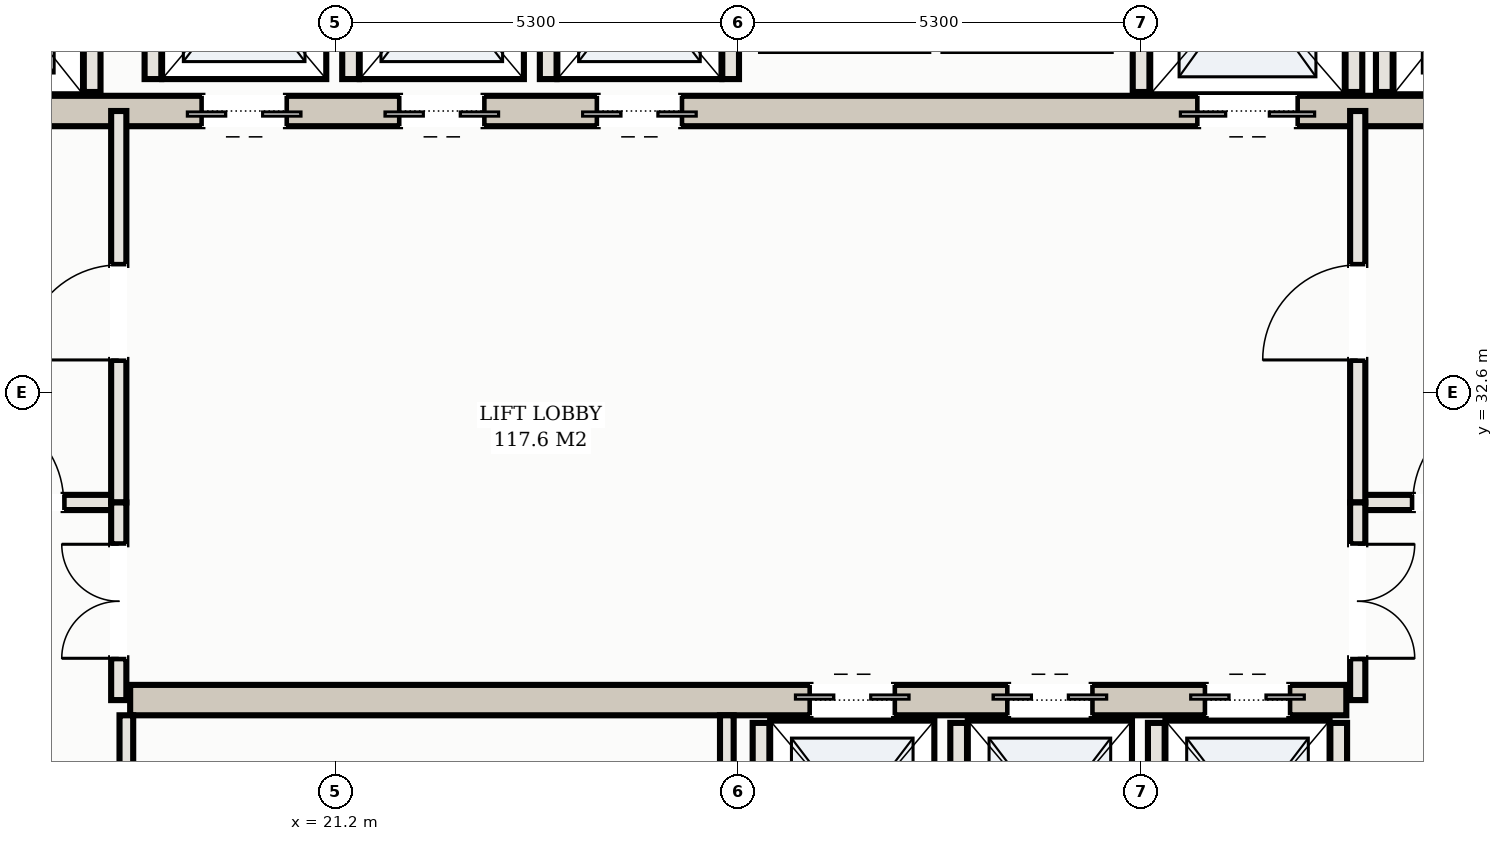
"""IFC4 building model, lengths in metres.
Left out: names, types, materials, properties, quantities, classifications, styles, units other than length and angle.
Written with IfcOpenShell. Run it as: python <this file> out.ifc"""

import sys

from ifc_helpers import new_model, si_unit, direction, frame, frame_2d, origin, place, context, subcontext, project, spatial, rectangle, extrude, element, fill, save


model = new_model("IFC4")
c1 = context("Model", 3, precision=1e-05, world=origin(), true_north=direction((0.0, 1.0)))
c2 = subcontext(c1, "Body", "Model", "MODEL_VIEW")
j1 = project(units=[si_unit("LENGTHUNIT", "METRE"), si_unit("PLANEANGLEUNIT", "RADIAN")], contexts=[c1])
p1 = place(None, origin())
s1 = spatial("IfcSite", under=j1, at=p1, CompositionType="ELEMENT")
p2 = place(p1, origin())
s2 = spatial("IfcBuilding", under=s1, at=p2, CompositionType="ELEMENT")
p3 = place(p2, frame((0.0, 0.0, 134.7)))
s3 = spatial("IfcBuildingStorey", under=s2, at=p3, CompositionType="ELEMENT", Elevation=134.7)
p4 = place(p3, frame((15.5, 36.3, 0.0), z_axis=(0.0, 0.0, 1.0), x_axis=(1.0, 0.0, 0.0)))
e1 = element("IfcWall", 1, at=p4, inside=s3, PredefinedType="SHEAR", context=c2, shape_type="SweptSolid", body=[
    extrude(rectangle(XDim=22.0, YDim=0.4, at=frame_2d((11.0, 0.0))), origin(), (0.0, 0.0, 1.0), 4.3),
])
p5 = place(p4, frame((0.65, 0.0, 0.0)))
e2 = element("IfcOpeningElement", 2, at=p5, cuts=e1, PredefinedType="OPENING", context=c2, shape_type="SweptSolid", body=[
    extrude(rectangle(XDim=1.1, YDim=2.15, at=frame_2d((0.55, 1.075))), frame((0.0, 0.21, 0.0), z_axis=(0.0, -1.0, 0.0), x_axis=(1.0, 0.0, 0.0)), (0.0, 0.0, 1.0), 0.42),
])
p6 = place(p4, frame((20.25, 0.0, 0.0)))
e3 = element("IfcOpeningElement", 3, at=p6, cuts=e1, PredefinedType="OPENING", context=c2, shape_type="SweptSolid", body=[
    extrude(rectangle(XDim=1.1, YDim=2.15, at=frame_2d((0.55, 1.075))), frame((0.0, 0.21, 0.0), z_axis=(0.0, -1.0, 0.0), x_axis=(1.0, 0.0, 0.0)), (0.0, 0.0, 1.0), 0.42),
])
p7 = place(p4, frame((17.05, 0.0, 0.0)))
e4 = element("IfcOpeningElement", 4, at=p7, cuts=e1, PredefinedType="OPENING", context=c2, shape_type="SweptSolid", body=[
    extrude(rectangle(XDim=1.3, YDim=2.2, at=frame_2d((0.65, 1.1))), frame((0.0, 0.21, 0.0), z_axis=(0.0, -1.0, 0.0), x_axis=(1.0, 0.0, 0.0)), (0.0, 0.0, 1.0), 0.42),
])
p8 = place(p4, frame((3.95, 0.0, 0.0)))
e5 = element("IfcOpeningElement", 5, at=p8, cuts=e1, PredefinedType="OPENING", context=c2, shape_type="SweptSolid", body=[
    extrude(rectangle(XDim=1.1, YDim=2.15, at=frame_2d((0.55, 1.075))), frame((0.0, 0.21, 0.0), z_axis=(0.0, -1.0, 0.0), x_axis=(1.0, 0.0, 0.0)), (0.0, 0.0, 1.0), 0.42),
])
p9 = place(p4, frame((6.55, 0.0, 0.0)))
e6 = element("IfcOpeningElement", 6, at=p9, cuts=e1, PredefinedType="OPENING", context=c2, shape_type="SweptSolid", body=[
    extrude(rectangle(XDim=1.1, YDim=2.15, at=frame_2d((0.55, 1.075))), frame((0.0, 0.21, 0.0), z_axis=(0.0, -1.0, 0.0), x_axis=(1.0, 0.0, 0.0)), (0.0, 0.0, 1.0), 0.42),
])
p10 = place(p4, frame((9.15, 0.0, 0.0)))
e7 = element("IfcOpeningElement", 7, at=p10, cuts=e1, PredefinedType="OPENING", context=c2, shape_type="SweptSolid", body=[
    extrude(rectangle(XDim=1.1, YDim=2.15, at=frame_2d((0.55, 1.075))), frame((0.0, 0.21, 0.0), z_axis=(0.0, -1.0, 0.0), x_axis=(1.0, 0.0, 0.0)), (0.0, 0.0, 1.0), 0.42),
])
p11 = place(p3, frame((18.5, 28.55, 0.0), z_axis=(0.0, 0.0, 1.0), x_axis=(1.0, 0.0, 0.0)))
e8 = element("IfcWall", 8, at=p11, inside=s3, PredefinedType="SHEAR", context=c2, shape_type="SweptSolid", body=[
    extrude(rectangle(XDim=16.0, YDim=0.4, at=frame_2d((8.0, 0.0))), origin(), (0.0, 0.0, 1.0), 4.3),
])
p12 = place(p11, frame((8.95, 0.0, 0.0)))
e9 = element("IfcOpeningElement", 9, at=p12, cuts=e8, PredefinedType="OPENING", context=c2, shape_type="SweptSolid", body=[
    extrude(rectangle(XDim=1.1, YDim=2.15, at=frame_2d((0.55, 1.075))), frame((0.0, 0.21, 0.0), z_axis=(0.0, -1.0, 0.0), x_axis=(1.0, 0.0, 0.0)), (0.0, 0.0, 1.0), 0.42),
])
p13 = place(p11, frame((11.55, 0.0, 0.0)))
e10 = element("IfcOpeningElement", 10, at=p13, cuts=e8, PredefinedType="OPENING", context=c2, shape_type="SweptSolid", body=[
    extrude(rectangle(XDim=1.1, YDim=2.15, at=frame_2d((0.55, 1.075))), frame((0.0, 0.21, 0.0), z_axis=(0.0, -1.0, 0.0), x_axis=(1.0, 0.0, 0.0)), (0.0, 0.0, 1.0), 0.42),
])
p14 = place(p11, frame((14.15, 0.0, 0.0)))
e11 = element("IfcOpeningElement", 11, at=p14, cuts=e8, PredefinedType="OPENING", context=c2, shape_type="SweptSolid", body=[
    extrude(rectangle(XDim=1.1, YDim=2.15, at=frame_2d((0.55, 1.075))), frame((0.0, 0.21, 0.0), z_axis=(0.0, -1.0, 0.0), x_axis=(1.0, 0.0, 0.0)), (0.0, 0.0, 1.0), 0.42),
])
for number, where, z_axis, x_axis in (
    (12, (18.0, 36.55, 0.0), (0.0, 0.0, 1.0), (0.0, 1.0, 0.0)),
    (13, (35.0, 36.55, 0.0), (0.0, 0.0, 1.0), (0.0, 1.0, 0.0)),
    (14, (31.8, 36.55, 0.0), (0.0, 0.0, 1.0), (0.0, 1.0, 0.0)),
    (15, (34.6, 36.55, 0.0), (0.0, 0.0, 1.0), (0.0, 1.0, 0.0)),
):
    element("IfcWall", number, at=place(p3, frame(where, z_axis=z_axis, x_axis=x_axis)), inside=s3, PredefinedType="SOLIDWALL", context=c2, shape_type="SweptSolid", body=[
        extrude(rectangle(XDim=2.93, YDim=0.22, at=frame_2d((1.465, 0.0))), origin(), (0.0, 0.0, 1.0), 4.3),
    ])
for number, where, z_axis, x_axis in (
    (16, (26.8, 25.72, 0.0), (0.0, 0.0, 1.0), (0.0, 1.0, 0.0)),
    (17, (29.4, 25.72, 0.0), (0.0, 0.0, 1.0), (0.0, 1.0, 0.0)),
    (18, (32.0, 25.72, 0.0), (0.0, 0.0, 1.0), (0.0, 1.0, 0.0)),
    (19, (34.4, 25.72, 0.0), (0.0, 0.0, 1.0), (0.0, 1.0, 0.0)),
):
    element("IfcWall", number, at=place(p3, frame(where, z_axis=z_axis, x_axis=x_axis)), inside=s3, PredefinedType="SOLIDWALL", context=c2, shape_type="SweptSolid", body=[
        extrude(rectangle(XDim=2.53, YDim=0.22, at=frame_2d((1.265, 0.0))), origin(), (0.0, 0.0, 1.0), 4.3),
    ])
for number, where, z_axis, x_axis in (
    (20, (18.8, 36.72, 0.0), (0.0, 0.0, 1.0), (0.0, 1.0, 0.0)),
    (21, (21.4, 36.72, 0.0), (0.0, 0.0, 1.0), (0.0, 1.0, 0.0)),
    (22, (24.0, 36.72, 0.0), (0.0, 0.0, 1.0), (0.0, 1.0, 0.0)),
    (23, (26.4, 36.72, 0.0), (0.0, 0.0, 1.0), (0.0, 1.0, 0.0)),
):
    element("IfcWall", number, at=place(p3, frame(where, z_axis=z_axis, x_axis=x_axis)), inside=s3, PredefinedType="SOLIDWALL", context=c2, shape_type="SweptSolid", body=[
        extrude(rectangle(XDim=2.56, YDim=0.22, at=frame_2d((1.28, 0.0))), origin(), (0.0, 0.0, 1.0), 4.3),
    ])
p15 = place(p3, frame((15.1, 31.15, 0.0), z_axis=(0.0, 0.0, 1.0), x_axis=(1.0, 0.0, 0.0)))
e24 = element("IfcWall", 24, at=p15, inside=s3, PredefinedType="PARTITIONING", context=c2, shape_type="SweptSolid", body=[
    extrude(rectangle(XDim=3.25, YDim=0.2, at=frame_2d((1.625, 0.0))), origin(), (0.0, 0.0, 1.0), 4.3),
])
p16 = place(p15, frame((1.275, 0.0, 0.0)))
e25 = element("IfcOpeningElement", 25, at=p16, cuts=e24, PredefinedType="OPENING", context=c2, shape_type="SweptSolid", body=[
    extrude(rectangle(XDim=1.25, YDim=2.2, at=frame_2d((0.625, 1.1))), frame((0.0, 0.11, 0.0), z_axis=(0.0, -1.0, 0.0), x_axis=(1.0, 0.0, 0.0)), (0.0, 0.0, 1.0), 0.22),
])
p17 = place(p3, frame((18.35, 31.15, 0.0), z_axis=(0.0, 0.0, 1.0), x_axis=(0.0, 1.0, 0.0)))
e26 = element("IfcWall", 26, at=p17, inside=s3, PredefinedType="PARTITIONING", context=c2, shape_type="SweptSolid", body=[
    extrude(rectangle(XDim=5.15, YDim=0.2, at=frame_2d((2.575, 0.0))), origin(), (0.0, 0.0, 1.0), 4.3),
])
p18 = place(p17, frame((1.875, 0.0, 0.0)))
e27 = element("IfcOpeningElement", 27, at=p18, cuts=e26, PredefinedType="OPENING", context=c2, shape_type="SweptSolid", body=[
    extrude(rectangle(XDim=1.25, YDim=2.2, at=frame_2d((0.625, 1.1))), frame((0.0, 0.11, 0.0), z_axis=(0.0, -1.0, 0.0), x_axis=(1.0, 0.0, 0.0)), (0.0, 0.0, 1.0), 0.22),
])
p19 = place(p3, frame((34.65, 31.15, 0.0), z_axis=(0.0, 0.0, 1.0), x_axis=(1.0, 0.0, 0.0)))
e28 = element("IfcWall", 28, at=p19, inside=s3, PredefinedType="PARTITIONING", context=c2, shape_type="SweptSolid", body=[
    extrude(rectangle(XDim=3.25, YDim=0.2, at=frame_2d((1.625, 0.0))), origin(), (0.0, 0.0, 1.0), 4.3),
])
p20 = place(p19, frame((0.725, 0.0, 0.0)))
e29 = element("IfcOpeningElement", 29, at=p20, cuts=e28, PredefinedType="OPENING", context=c2, shape_type="SweptSolid", body=[
    extrude(rectangle(XDim=1.25, YDim=2.2, at=frame_2d((0.625, 1.1))), frame((0.0, 0.11, 0.0), z_axis=(0.0, -1.0, 0.0), x_axis=(1.0, 0.0, 0.0)), (0.0, 0.0, 1.0), 0.22),
])
p21 = place(p3, frame((34.65, 31.15, 0.0), z_axis=(0.0, 0.0, 1.0), x_axis=(0.0, 1.0, 0.0)))
e30 = element("IfcWall", 30, at=p21, inside=s3, PredefinedType="PARTITIONING", context=c2, shape_type="SweptSolid", body=[
    extrude(rectangle(XDim=5.15, YDim=0.2, at=frame_2d((2.575, 0.0))), origin(), (0.0, 0.0, 1.0), 4.3),
])
p22 = place(p21, frame((1.875, 0.0, 0.0)))
e31 = element("IfcOpeningElement", 31, at=p22, cuts=e30, PredefinedType="OPENING", context=c2, shape_type="SweptSolid", body=[
    extrude(rectangle(XDim=1.25, YDim=2.2, at=frame_2d((0.625, 1.1))), frame((0.0, 0.11, 0.0), z_axis=(0.0, -1.0, 0.0), x_axis=(1.0, 0.0, 0.0)), (0.0, 0.0, 1.0), 0.22),
])
p23 = place(p3, frame((18.35, 28.55, 0.0), z_axis=(0.0, 0.0, 1.0), x_axis=(0.0, 1.0, 0.0)))
e32 = element("IfcWall", 32, at=p23, inside=s3, PredefinedType="PARTITIONING", context=c2, shape_type="SweptSolid", body=[
    extrude(rectangle(XDim=2.6, YDim=0.2, at=frame_2d((1.3, 0.0))), origin(), (0.0, 0.0, 1.0), 4.3),
])
p24 = place(p23, frame((0.55, 0.0, 0.0)))
e33 = element("IfcOpeningElement", 33, at=p24, cuts=e32, PredefinedType="OPENING", context=c2, shape_type="SweptSolid", body=[
    extrude(rectangle(XDim=1.5, YDim=2.25, at=frame_2d((0.75, 1.125))), frame((0.0, 0.11, 0.0), z_axis=(0.0, -1.0, 0.0), x_axis=(1.0, 0.0, 0.0)), (0.0, 0.0, 1.0), 0.22),
])
p25 = place(p3, frame((34.65, 28.55, 0.0), z_axis=(0.0, 0.0, 1.0), x_axis=(0.0, 1.0, 0.0)))
e34 = element("IfcWall", 34, at=p25, inside=s3, PredefinedType="PARTITIONING", context=c2, shape_type="SweptSolid", body=[
    extrude(rectangle(XDim=2.6, YDim=0.2, at=frame_2d((1.3, 0.0))), origin(), (0.0, 0.0, 1.0), 4.3),
])
p26 = place(p25, frame((0.55, 0.0, 0.0)))
e35 = element("IfcOpeningElement", 35, at=p26, cuts=e34, PredefinedType="OPENING", context=c2, shape_type="SweptSolid", body=[
    extrude(rectangle(XDim=1.5, YDim=2.25, at=frame_2d((0.75, 1.125))), frame((0.0, 0.11, 0.0), z_axis=(0.0, -1.0, 0.0), x_axis=(1.0, 0.0, 0.0)), (0.0, 0.0, 1.0), 0.22),
])
for number, where, z_axis, x_axis in (
    (36, (18.45, 25.62, 0.0), (0.0, 0.0, 1.0), (0.0, 1.0, 0.0)),
    (37, (26.35, 25.62, 0.0), (0.0, 0.0, 1.0), (0.0, 1.0, 0.0)),
):
    element("IfcWall", number, at=place(p3, frame(where, z_axis=z_axis, x_axis=x_axis)), inside=s3, PredefinedType="PARTITIONING", context=c2, shape_type="SweptSolid", body=[
        extrude(rectangle(XDim=2.73, YDim=0.18, at=frame_2d((1.365, 0.0))), origin(), (0.0, 0.0, 1.0), 4.3),
    ])
p27 = place(p7, frame((1.3, 0.0, 0.0), z_axis=(0.0, 0.0, 1.0), x_axis=(-1.0, 0.0, 0.0)))
e38 = element("IfcDoor", 38, at=p27, inside=s3, OperationType="DOUBLE_DOOR_SLIDING", PredefinedType="DOOR", context=c2, shape_type="SweptSolid", body=[
    extrude(rectangle(XDim=1.3, YDim=2.2, at=frame_2d((0.65, 1.1))), frame((0.0, 0.025, 0.0), z_axis=(0.0, -1.0, 0.0), x_axis=(1.0, 0.0, 0.0)), (0.0, 0.0, 1.0), 0.05),
])
fill(e4, e38)
p28 = place(p12, origin())
e39 = element("IfcDoor", 39, at=p28, inside=s3, OperationType="DOUBLE_DOOR_SLIDING", PredefinedType="DOOR", context=c2, shape_type="SweptSolid", body=[
    extrude(rectangle(XDim=1.1, YDim=2.15, at=frame_2d((0.55, 1.075))), frame((0.0, 0.025, 0.0), z_axis=(0.0, -1.0, 0.0), x_axis=(1.0, 0.0, 0.0)), (0.0, 0.0, 1.0), 0.05),
])
fill(e9, e39)
p29 = place(p13, origin())
e40 = element("IfcDoor", 40, at=p29, inside=s3, OperationType="DOUBLE_DOOR_SLIDING", PredefinedType="DOOR", context=c2, shape_type="SweptSolid", body=[
    extrude(rectangle(XDim=1.1, YDim=2.15, at=frame_2d((0.55, 1.075))), frame((0.0, 0.025, 0.0), z_axis=(0.0, -1.0, 0.0), x_axis=(1.0, 0.0, 0.0)), (0.0, 0.0, 1.0), 0.05),
])
fill(e10, e40)
p30 = place(p14, origin())
e41 = element("IfcDoor", 41, at=p30, inside=s3, OperationType="DOUBLE_DOOR_SLIDING", PredefinedType="DOOR", context=c2, shape_type="SweptSolid", body=[
    extrude(rectangle(XDim=1.1, YDim=2.15, at=frame_2d((0.55, 1.075))), frame((0.0, 0.025, 0.0), z_axis=(0.0, -1.0, 0.0), x_axis=(1.0, 0.0, 0.0)), (0.0, 0.0, 1.0), 0.05),
])
fill(e11, e41)
p31 = place(p8, frame((1.1, 0.0, 0.0), z_axis=(0.0, 0.0, 1.0), x_axis=(-1.0, 0.0, 0.0)))
e42 = element("IfcDoor", 42, at=p31, inside=s3, OperationType="DOUBLE_DOOR_SLIDING", PredefinedType="DOOR", context=c2, shape_type="SweptSolid", body=[
    extrude(rectangle(XDim=1.1, YDim=2.15, at=frame_2d((0.55, 1.075))), frame((0.0, 0.025, 0.0), z_axis=(0.0, -1.0, 0.0), x_axis=(1.0, 0.0, 0.0)), (0.0, 0.0, 1.0), 0.05),
])
fill(e5, e42)
p32 = place(p9, frame((1.1, 0.0, 0.0), z_axis=(0.0, 0.0, 1.0), x_axis=(-1.0, 0.0, 0.0)))
e43 = element("IfcDoor", 43, at=p32, inside=s3, OperationType="DOUBLE_DOOR_SLIDING", PredefinedType="DOOR", context=c2, shape_type="SweptSolid", body=[
    extrude(rectangle(XDim=1.1, YDim=2.15, at=frame_2d((0.55, 1.075))), frame((0.0, 0.025, 0.0), z_axis=(0.0, -1.0, 0.0), x_axis=(1.0, 0.0, 0.0)), (0.0, 0.0, 1.0), 0.05),
])
fill(e6, e43)
p33 = place(p10, frame((1.1, 0.0, 0.0), z_axis=(0.0, 0.0, 1.0), x_axis=(-1.0, 0.0, 0.0)))
e44 = element("IfcDoor", 44, at=p33, inside=s3, OperationType="DOUBLE_DOOR_SLIDING", PredefinedType="DOOR", context=c2, shape_type="SweptSolid", body=[
    extrude(rectangle(XDim=1.1, YDim=2.15, at=frame_2d((0.55, 1.075))), frame((0.0, 0.025, 0.0), z_axis=(0.0, -1.0, 0.0), x_axis=(1.0, 0.0, 0.0)), (0.0, 0.0, 1.0), 0.05),
])
fill(e7, e44)
p34 = place(p16, origin())
e45 = element("IfcDoor", 45, at=p34, inside=s3, OperationType="SINGLE_SWING_LEFT", PredefinedType="DOOR", context=c2, shape_type="SweptSolid", body=[
    extrude(rectangle(XDim=1.25, YDim=2.2, at=frame_2d((0.625, 1.1))), frame((0.0, 0.025, 0.0), z_axis=(0.0, -1.0, 0.0), x_axis=(1.0, 0.0, 0.0)), (0.0, 0.0, 1.0), 0.05),
])
fill(e25, e45)
p35 = place(p18, origin())
e46 = element("IfcDoor", 46, at=p35, inside=s3, OperationType="SINGLE_SWING_LEFT", PredefinedType="DOOR", context=c2, shape_type="SweptSolid", body=[
    extrude(rectangle(XDim=1.25, YDim=2.2, at=frame_2d((0.625, 1.1))), frame((0.0, 0.025, 0.0), z_axis=(0.0, -1.0, 0.0), x_axis=(1.0, 0.0, 0.0)), (0.0, 0.0, 1.0), 0.05),
])
fill(e27, e46)
p36 = place(p20, origin())
e47 = element("IfcDoor", 47, at=p36, inside=s3, OperationType="SINGLE_SWING_RIGHT", PredefinedType="DOOR", context=c2, shape_type="SweptSolid", body=[
    extrude(rectangle(XDim=1.25, YDim=2.2, at=frame_2d((0.625, 1.1))), frame((0.0, 0.025, 0.0), z_axis=(0.0, -1.0, 0.0), x_axis=(1.0, 0.0, 0.0)), (0.0, 0.0, 1.0), 0.05),
])
fill(e29, e47)
p37 = place(p22, origin())
e48 = element("IfcDoor", 48, at=p37, inside=s3, OperationType="SINGLE_SWING_LEFT", PredefinedType="DOOR", context=c2, shape_type="SweptSolid", body=[
    extrude(rectangle(XDim=1.25, YDim=2.2, at=frame_2d((0.625, 1.1))), frame((0.0, 0.025, 0.0), z_axis=(0.0, -1.0, 0.0), x_axis=(1.0, 0.0, 0.0)), (0.0, 0.0, 1.0), 0.05),
])
fill(e31, e48)
p38 = place(p24, origin())
e49 = element("IfcDoor", 49, at=p38, inside=s3, OperationType="DOUBLE_DOOR_SINGLE_SWING", PredefinedType="DOOR", context=c2, shape_type="SweptSolid", body=[
    extrude(rectangle(XDim=1.5, YDim=2.25, at=frame_2d((0.75, 1.125))), frame((0.0, 0.025, 0.0), z_axis=(0.0, -1.0, 0.0), x_axis=(1.0, 0.0, 0.0)), (0.0, 0.0, 1.0), 0.05),
])
fill(e33, e49)
p39 = place(p26, frame((1.5, 0.0, 0.0), z_axis=(0.0, 0.0, 1.0), x_axis=(-1.0, 0.0, 0.0)))
e50 = element("IfcDoor", 50, at=p39, inside=s3, OperationType="DOUBLE_DOOR_SINGLE_SWING", PredefinedType="DOOR", context=c2, shape_type="SweptSolid", body=[
    extrude(rectangle(XDim=1.5, YDim=2.25, at=frame_2d((0.75, 1.125))), frame((0.0, 0.025, 0.0), z_axis=(0.0, -1.0, 0.0), x_axis=(1.0, 0.0, 0.0)), (0.0, 0.0, 1.0), 0.05),
])
fill(e35, e50)
save(model, sys.argv[1])
